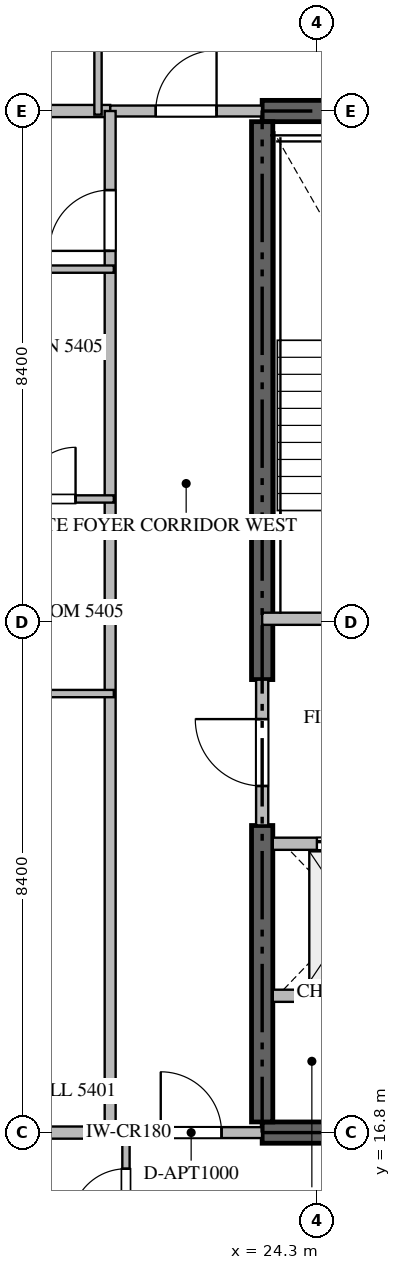
"""IFC4 building model, lengths in metres.
Left out: names, types, materials, properties, quantities, classifications, styles, units other than length and angle.
Written with IfcOpenShell. Run it as: python <this file> out.ifc"""

import sys

from ifc_helpers import new_model, si_unit, direction, frame, frame_2d, origin, place, context, subcontext, project, spatial, rectangle, extrude, source, transform, mapped, element, fill, save


model = new_model("IFC4")
c1 = context("Model", 3, precision=1e-05, world=origin(), true_north=direction((0.0, 1.0)))
c2 = subcontext(c1, "Body", "Model", "MODEL_VIEW")
j1 = project(units=[si_unit("LENGTHUNIT", "METRE"), si_unit("PLANEANGLEUNIT", "RADIAN")], contexts=[c1])
p1 = place(None, origin())
s1 = spatial("IfcSite", under=j1, at=p1, CompositionType="ELEMENT")
p2 = place(p1, origin())
s2 = spatial("IfcBuilding", under=s1, at=p2, CompositionType="ELEMENT")
p3 = place(p2, frame((0.0, 0.0, 218.15)))
s3 = spatial("IfcBuildingStorey", under=s2, at=p3, CompositionType="ELEMENT", Elevation=218.15)
for number, where, z_axis, x_axis in (
    (1, (23.4, 16.8, -0.26), (0.0, 0.0, 1.0), (1.0, 0.0, 0.0)),
    (2, (41.4, 33.6, -0.26), (0.0, 0.0, 1.0), (-1.0, 0.0, 0.0)),
):
    element("IfcWall", number, at=place(p3, frame(where, z_axis=z_axis, x_axis=x_axis)), inside=s3, PredefinedType="SHEAR", context=c2, shape_type="SweptSolid", body=[
        extrude(rectangle(XDim=18.0, YDim=0.35, at=frame_2d((9.0, 0.0))), origin(), (0.0, 0.0, 1.0), 3.848),
    ])
p4 = place(p3, frame((23.4, 16.975, -0.26), z_axis=(0.0, 0.0, 1.0), x_axis=(0.0, 1.0, 0.0)))
e3 = element("IfcWall", 3, at=p4, inside=s3, PredefinedType="SHEAR", context=c2, shape_type="SweptSolid", body=[
    extrude(rectangle(XDim=4.875, YDim=0.35, at=frame_2d((2.438, 0.0))), origin(), (0.0, 0.0, 1.0), 3.848),
])
p5 = place(p3, frame((23.4, 24.25, -0.26), z_axis=(0.0, 0.0, 1.0), x_axis=(0.0, 1.0, 0.0)))
e4 = element("IfcWall", 4, at=p5, inside=s3, PredefinedType="SHEAR", context=c2, shape_type="SweptSolid", body=[
    extrude(rectangle(XDim=9.175, YDim=0.35, at=frame_2d((4.587, 0.0))), origin(), (0.0, 0.0, 1.0), 3.848),
])
p6 = place(p3, frame((23.4, 25.25, 0.0), z_axis=(0.0, 0.0, 1.0), x_axis=(1.0, 0.0, 0.0)))
e5 = element("IfcWall", 5, at=p6, inside=s3, PredefinedType="STANDARD", context=c2, shape_type="SweptSolid", body=[
    extrude(rectangle(XDim=4.45, YDim=0.2, at=frame_2d((2.225, 0.0))), origin(), (0.0, 0.0, 1.0), 3.59),
])
p7 = place(p6, frame((1.65, 0.0, 0.0)))
e6 = element("IfcOpeningElement", 6, at=p7, cuts=e5, PredefinedType="OPENING", context=c2, shape_type="SweptSolid", body=[
    extrude(rectangle(XDim=1.1, YDim=2.15, at=frame_2d((0.55, 1.075))), frame((0.0, 0.11, 0.0), z_axis=(0.0, -1.0, 0.0), x_axis=(1.0, 0.0, 0.0)), (0.0, 0.0, 1.0), 0.22),
])
p8 = place(p3, frame((23.575, 21.55, 0.0), z_axis=(0.0, 0.0, 1.0), x_axis=(1.0, 0.0, 0.0)))
e7 = element("IfcWall", 7, at=p8, inside=s3, PredefinedType="STANDARD", context=c2, shape_type="SweptSolid", body=[
    extrude(rectangle(XDim=2.475, YDim=0.2, at=frame_2d((1.238, 0.0))), origin(), (0.0, 0.0, 1.0), 3.59),
])
p9 = place(p8, frame((0.725, 0.0, 0.0)))
e8 = element("IfcOpeningElement", 8, at=p9, cuts=e7, PredefinedType="OPENING", context=c2, shape_type="SweptSolid", body=[
    extrude(rectangle(XDim=1.2, YDim=2.2, at=frame_2d((0.6, 1.1))), frame((0.0, 0.11, 0.0), z_axis=(0.0, -1.0, 0.0), x_axis=(1.0, 0.0, 0.0)), (0.0, 0.0, 1.0), 0.22),
])
p10 = place(p3, frame((23.575, 19.05, 0.0), z_axis=(0.0, 0.0, 1.0), x_axis=(1.0, 0.0, 0.0)))
e9 = element("IfcWall", 9, at=p10, inside=s3, PredefinedType="STANDARD", context=c2, shape_type="SweptSolid", body=[
    extrude(rectangle(XDim=2.475, YDim=0.2, at=frame_2d((1.238, 0.0))), origin(), (0.0, 0.0, 1.0), 3.59),
])
p11 = place(p3, frame((23.4, 21.852, 0.0), z_axis=(0.0, 0.0, 1.0), x_axis=(0.0, 1.0, 0.0)))
e10 = element("IfcWall", 10, at=p11, inside=s3, PredefinedType="STANDARD", context=c2, shape_type="SweptSolid", body=[
    extrude(rectangle(XDim=2.396, YDim=0.2, at=frame_2d((1.198, 0.0))), origin(), (0.0, 0.0, 1.0), 3.59),
])
p12 = place(p11, frame((0.648, 0.0, 0.0)))
e11 = element("IfcOpeningElement", 11, at=p12, cuts=e10, PredefinedType="OPENING", context=c2, shape_type="SweptSolid", body=[
    extrude(rectangle(XDim=1.1, YDim=2.15, at=frame_2d((0.55, 1.075))), frame((0.0, 0.11, 0.0), z_axis=(0.0, -1.0, 0.0), x_axis=(1.0, 0.0, 0.0)), (0.0, 0.0, 1.0), 0.22),
])
for number, where, z_axis, x_axis in (
    (12, (7.482, 16.8, 0.0), (0.0, 0.0, 1.0), (1.0, 0.0, 0.0)),
    (13, (7.482, 33.6, 0.0), (0.0, 0.0, 1.0), (1.0, 0.0, 0.0)),
):
    element("IfcWall", number, at=place(p3, frame(where, z_axis=z_axis, x_axis=x_axis)), inside=s3, PredefinedType="PARTITIONING", context=c2, shape_type="SweptSolid", body=[
        extrude(rectangle(XDim=13.418, YDim=0.2, at=frame_2d((6.709, 0.0))), origin(), (0.0, 0.0, 1.0), 3.59),
    ])
p13 = place(p3, frame((20.902, 16.8, 0.0), z_axis=(0.0, 0.0, 1.0), x_axis=(1.0, 0.0, 0.0)))
e14 = element("IfcWall", 14, at=p13, inside=s3, PredefinedType="PARTITIONING", context=c2, shape_type="SweptSolid", body=[
    extrude(rectangle(XDim=2.496, YDim=0.18, at=frame_2d((1.248, 0.0))), origin(), (0.0, 0.0, 1.0), 3.59),
])
p14 = place(p13, frame((0.83, 0.0, 0.0)))
e15 = element("IfcOpeningElement", 15, at=p14, cuts=e14, PredefinedType="OPENING", context=c2, shape_type="SweptSolid", body=[
    extrude(rectangle(XDim=1.0, YDim=2.15, at=frame_2d((0.5, 1.075))), frame((0.0, 0.1, 0.0), z_axis=(0.0, -1.0, 0.0), x_axis=(1.0, 0.0, 0.0)), (0.0, 0.0, 1.0), 0.2),
])
p15 = place(p3, frame((20.902, 33.6, 0.0), z_axis=(0.0, 0.0, 1.0), x_axis=(1.0, 0.0, 0.0)))
e16 = element("IfcWall", 16, at=p15, inside=s3, PredefinedType="PARTITIONING", context=c2, shape_type="SweptSolid", body=[
    extrude(rectangle(XDim=2.496, YDim=0.18, at=frame_2d((1.248, 0.0))), origin(), (0.0, 0.0, 1.0), 3.59),
])
p16 = place(p15, frame((0.748, 0.0, 0.0)))
e17 = element("IfcOpeningElement", 17, at=p16, cuts=e16, PredefinedType="OPENING", context=c2, shape_type="SweptSolid", body=[
    extrude(rectangle(XDim=1.0, YDim=2.15, at=frame_2d((0.5, 1.075))), frame((0.0, 0.1, 0.0), z_axis=(0.0, -1.0, 0.0), x_axis=(1.0, 0.0, 0.0)), (0.0, 0.0, 1.0), 0.2),
])
p17 = place(p3, frame((20.9, 16.8, 0.0), z_axis=(0.0, 0.0, 1.0), x_axis=(0.0, 1.0, 0.0)))
e18 = element("IfcWall", 18, at=p17, inside=s3, PredefinedType="PARTITIONING", context=c2, shape_type="SweptSolid", body=[
    extrude(rectangle(XDim=16.8, YDim=0.18, at=frame_2d((8.4, 0.0))), origin(), (0.0, 0.0, 1.0), 3.59),
])
p18 = place(p17, frame((14.5, 0.0, 0.0)))
e19 = element("IfcOpeningElement", 19, at=p18, cuts=e18, PredefinedType="OPENING", context=c2, shape_type="SweptSolid", body=[
    extrude(rectangle(XDim=1.0, YDim=2.15, at=frame_2d((0.5, 1.075))), frame((0.0, 0.1, 0.0), z_axis=(0.0, -1.0, 0.0), x_axis=(1.0, 0.0, 0.0)), (0.0, 0.0, 1.0), 0.2),
])
p19 = place(p3, frame((21.16, 14.65, 0.0), z_axis=(0.0, 0.0, 1.0), x_axis=(0.0, 1.0, 0.0)))
e20 = element("IfcWall", 20, at=p19, inside=s3, PredefinedType="PARTITIONING", context=c2, shape_type="SweptSolid", body=[
    extrude(rectangle(XDim=2.21, YDim=0.12, at=frame_2d((1.105, 0.0))), origin(), (0.0, 0.0, 1.0), 3.59),
])
p20 = place(p19, frame((0.655, 0.0, 0.0)))
e21 = element("IfcOpeningElement", 21, at=p20, cuts=e20, PredefinedType="OPENING", context=c2, shape_type="SweptSolid", body=[
    extrude(rectangle(XDim=0.9, YDim=2.1, at=frame_2d((0.45, 1.05))), frame((0.0, 0.07, 0.0), z_axis=(0.0, -1.0, 0.0), x_axis=(1.0, 0.0, 0.0)), (0.0, 0.0, 1.0), 0.14),
])
for number, where, z_axis, x_axis in (
    (22, (20.7, 36.35, 0.0), (0.0, 0.0, 1.0), (0.0, -1.0, 0.0)),
    (23, (18.15, 31.0, 0.0), (0.0, 0.0, 1.0), (1.0, 0.0, 0.0)),
):
    element("IfcWall", number, at=place(p3, frame(where, z_axis=z_axis, x_axis=x_axis)), inside=s3, PredefinedType="PARTITIONING", context=c2, shape_type="SweptSolid", body=[
        extrude(rectangle(XDim=2.81, YDim=0.12, at=frame_2d((1.405, 0.0))), origin(), (0.0, 0.0, 1.0), 3.59),
    ])
p21 = place(p3, frame((18.85, 24.02, 0.0), z_axis=(0.0, 0.0, 1.0), x_axis=(1.0, 0.0, 0.0)))
e24 = element("IfcWall", 24, at=p21, inside=s3, PredefinedType="PARTITIONING", context=c2, shape_type="SweptSolid", body=[
    extrude(rectangle(XDim=2.11, YDim=0.12, at=frame_2d((1.055, 0.0))), origin(), (0.0, 0.0, 1.0), 3.59),
])
p22 = place(p3, frame((18.852, 27.22, 0.0), z_axis=(0.0, 0.0, 1.0), x_axis=(1.0, 0.0, 0.0)))
e25 = element("IfcWall", 25, at=p22, inside=s3, PredefinedType="PARTITIONING", context=c2, shape_type="SweptSolid", body=[
    extrude(rectangle(XDim=2.108, YDim=0.12, at=frame_2d((1.054, 0.0))), origin(), (0.0, 0.0, 1.0), 3.59),
])
p23 = place(p22, frame((0.629, 0.0, 0.0)))
e26 = element("IfcOpeningElement", 26, at=p23, cuts=e25, PredefinedType="OPENING", context=c2, shape_type="SweptSolid", body=[
    extrude(rectangle(XDim=0.85, YDim=2.1, at=frame_2d((0.425, 1.05))), frame((0.0, 0.07, 0.0), z_axis=(0.0, -1.0, 0.0), x_axis=(1.0, 0.0, 0.0)), (0.0, 0.0, 1.0), 0.14),
])
m1 = source(origin(), c2, "Body", "SweptSolid", [
    extrude(rectangle(XDim=1.2, YDim=2.2, at=frame_2d((0.6, 1.1))), frame((0.0, 0.025, 0.0), z_axis=(0.0, -1.0, 0.0), x_axis=(1.0, 0.0, 0.0)), (0.0, 0.0, 1.0), 0.05),
])
p24 = place(p9, origin())
e27 = element("IfcDoor", 27, at=p24, inside=s3, OperationType="DOUBLE_DOOR_SLIDING", PredefinedType="DOOR", context=c2, shape_type="MappedRepresentation", body=[
    mapped(m1, transform((0.0, 0.0, 0.0), scale=1.0)),
])
fill(e8, e27)
m2 = source(origin(), c2, "Body", "SweptSolid", [
    extrude(rectangle(XDim=1.1, YDim=2.15, at=frame_2d((0.55, 1.075))), frame((0.0, 0.025, 0.0), z_axis=(0.0, -1.0, 0.0), x_axis=(1.0, 0.0, 0.0)), (0.0, 0.0, 1.0), 0.05),
])
p25 = place(p12, origin())
e28 = element("IfcDoor", 28, at=p25, inside=s3, OperationType="SINGLE_SWING_RIGHT", PredefinedType="DOOR", context=c2, shape_type="MappedRepresentation", body=[
    mapped(m2, transform((0.0, 0.0, 0.0), scale=1.0)),
])
fill(e11, e28)
m3 = source(origin(), c2, "Body", "SweptSolid", [
    extrude(rectangle(XDim=1.0, YDim=2.15, at=frame_2d((0.5, 1.075))), frame((0.0, 0.025, 0.0), z_axis=(0.0, -1.0, 0.0), x_axis=(1.0, 0.0, 0.0)), (0.0, 0.0, 1.0), 0.05),
])
p26 = place(p14, origin())
e29 = element("IfcDoor", 29, at=p26, inside=s3, OperationType="SINGLE_SWING_LEFT", PredefinedType="DOOR", context=c2, shape_type="MappedRepresentation", body=[
    mapped(m3, transform((0.0, 0.0, 0.0), scale=1.0)),
])
fill(e15, e29)
p27 = place(p16, origin())
e30 = element("IfcDoor", 30, at=p27, inside=s3, OperationType="SINGLE_SWING_RIGHT", PredefinedType="DOOR", context=c2, shape_type="MappedRepresentation", body=[
    mapped(m3, transform((0.0, 0.0, 0.0), scale=1.0)),
])
fill(e17, e30)
p28 = place(p18, origin())
e31 = element("IfcDoor", 31, at=p28, inside=s3, OperationType="SINGLE_SWING_LEFT", PredefinedType="DOOR", context=c2, shape_type="MappedRepresentation", body=[
    mapped(m3, transform((0.0, 0.0, 0.0), scale=1.0)),
])
fill(e19, e31)
m4 = source(origin(), c2, "Body", "SweptSolid", [
    extrude(rectangle(XDim=0.9, YDim=2.1, at=frame_2d((0.45, 1.05))), frame((0.0, 0.025, 0.0), z_axis=(0.0, -1.0, 0.0), x_axis=(1.0, 0.0, 0.0)), (0.0, 0.0, 1.0), 0.05),
])
p29 = place(p20, origin())
e32 = element("IfcDoor", 32, at=p29, inside=s3, OperationType="SINGLE_SWING_LEFT", PredefinedType="DOOR", context=c2, shape_type="MappedRepresentation", body=[
    mapped(m4, transform((0.0, 0.0, 0.0), scale=1.0)),
])
fill(e21, e32)
m5 = source(origin(), c2, "Body", "SweptSolid", [
    extrude(rectangle(XDim=0.85, YDim=2.1, at=frame_2d((0.425, 1.05))), frame((0.0, 0.025, 0.0), z_axis=(0.0, -1.0, 0.0), x_axis=(1.0, 0.0, 0.0)), (0.0, 0.0, 1.0), 0.05),
])
p30 = place(p23, origin())
e33 = element("IfcDoor", 33, at=p30, inside=s3, OperationType="SINGLE_SWING_RIGHT", PredefinedType="DOOR", context=c2, shape_type="MappedRepresentation", body=[
    mapped(m5, transform((0.0, 0.0, 0.0), scale=1.0)),
])
fill(e26, e33)
save(model, sys.argv[1])
